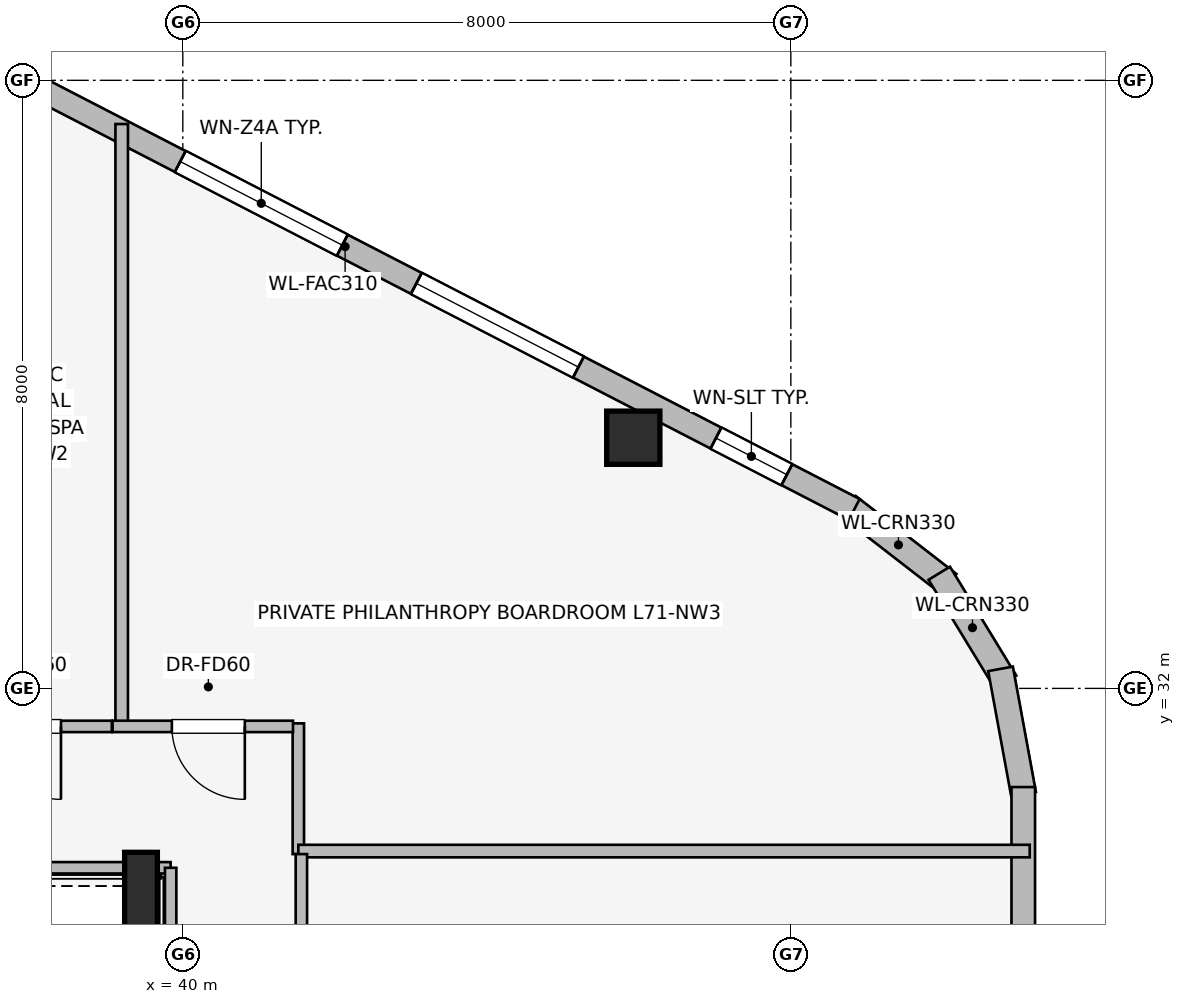
"""IFC4 building model, lengths in metres.
Left out: names, types, materials, properties, quantities, classifications, styles, units other than length and angle.
Written with IfcOpenShell. Run it as: python <this file> out.ifc"""

import sys

from ifc_helpers import new_model, si_unit, direction, frame, frame_2d, origin, origin_2d, place, context, subcontext, project, spatial, rectangle, i_section, extrude, element, fill, save


model = new_model("IFC4")
c1 = context("Model", 3, precision=1e-05, world=origin(), true_north=direction((0.0, 1.0)))
c2 = subcontext(c1, "Body", "Model", "MODEL_VIEW")
j1 = project(units=[si_unit("LENGTHUNIT", "METRE"), si_unit("PLANEANGLEUNIT", "RADIAN")], contexts=[c1])
p1 = place(None, origin())
s1 = spatial("IfcSite", under=j1, at=p1, CompositionType="ELEMENT")
p2 = place(p1, origin())
s2 = spatial("IfcBuilding", under=s1, at=p2, CompositionType="ELEMENT")
p3 = place(p2, frame((0.0, 0.0, 259.65)))
s3 = spatial("IfcBuildingStorey", under=s2, at=p3, CompositionType="ELEMENT", Elevation=259.65)
p4 = place(p3, frame((45.927, 35.298, 0.0), z_axis=(0.0, 0.0, 1.0), x_axis=(1.0, 0.0, 0.0)))
e1 = element("IfcColumn", 1, at=p4, inside=s3, PredefinedType="COLUMN", context=c2, shape_type="SweptSolid", body=[
    extrude(rectangle(XDim=0.7, YDim=0.7, at=origin_2d()), origin(), (0.0, 0.0, 1.0), 3.55),
])
p5 = place(p3, frame((39.45, 29.35, 0.0), z_axis=(0.0, 0.0, 1.0), x_axis=(1.0, 0.0, 0.0)))
e2 = element("IfcColumn", 2, at=p5, inside=s3, PredefinedType="COLUMN", context=c2, shape_type="SweptSolid", body=[
    extrude(i_section(OverallWidth=0.431, OverallDepth=0.987, WebThickness=0.034, FlangeThickness=0.062, at=origin_2d()), origin(), (0.0, 0.0, 1.0), 3.55),
])
p6 = place(p3, frame((48.753, 34.401, 0.0), z_axis=(0.0, 0.0, 1.0), x_axis=(0.790691856293, -0.61221433207, 0.0)))
e3 = element("IfcWall", 3, at=p6, inside=s3, PredefinedType="STANDARD", context=c2, shape_type="SweptSolid", body=[
    extrude(rectangle(XDim=1.676, YDim=0.33, at=frame_2d((0.838, 0.0))), origin(), (0.0, 0.0, 1.0), 3.29),
])
p7 = place(p3, frame((49.953, 33.515, 0.0), z_axis=(0.0, 0.0, 1.0), x_axis=(0.520325409202, -0.853968072318, 0.0)))
e4 = element("IfcWall", 4, at=p7, inside=s3, PredefinedType="STANDARD", context=c2, shape_type="SweptSolid", body=[
    extrude(rectangle(XDim=1.678, YDim=0.33, at=frame_2d((0.839, 0.0))), origin(), (0.0, 0.0, 1.0), 3.29),
])
p8 = place(p3, frame((50.759, 32.257, 0.0), z_axis=(0.0, 0.0, 1.0), x_axis=(0.180691763044, -0.983539773862, 0.0)))
e5 = element("IfcWall", 5, at=p8, inside=s3, PredefinedType="STANDARD", context=c2, shape_type="SweptSolid", body=[
    extrude(rectangle(XDim=1.677, YDim=0.33, at=frame_2d((0.838, 0.0))), origin(), (0.0, 0.0, 1.0), 3.29),
])
p9 = place(p3, frame((35.437, 41.27, 0.0), z_axis=(0.0, 0.0, 1.0), x_axis=(0.888581481622, -0.458718814218, 0.0)))
e6 = element("IfcWall", 6, at=p9, inside=s3, PredefinedType="STANDARD", context=c2, shape_type="SweptSolid", body=[
    extrude(rectangle(XDim=15.077, YDim=0.31, at=frame_2d((7.539, 0.0))), origin(), (0.0, 0.0, 1.0), 3.29),
])
p10 = place(p9, frame((5.097, 0.0, 0.75)))
e7 = element("IfcOpeningElement", 7, at=p10, cuts=e6, PredefinedType="OPENING", context=c2, shape_type="SweptSolid", body=[
    extrude(rectangle(XDim=2.4, YDim=1.6, at=frame_2d((1.2, 0.8))), frame((0.0, 0.165, 0.0), z_axis=(0.0, -1.0, 0.0), x_axis=(1.0, 0.0, 0.0)), (0.0, 0.0, 1.0), 0.33),
])
p11 = place(p9, frame((8.593, 0.0, 0.75)))
e8 = element("IfcOpeningElement", 8, at=p11, cuts=e6, PredefinedType="OPENING", context=c2, shape_type="SweptSolid", body=[
    extrude(rectangle(XDim=2.4, YDim=1.6, at=frame_2d((1.2, 0.8))), frame((0.0, 0.165, 0.0), z_axis=(0.0, -1.0, 0.0), x_axis=(1.0, 0.0, 0.0)), (0.0, 0.0, 1.0), 0.33),
])
p12 = place(p9, frame((13.029, 0.0, 0.75)))
e9 = element("IfcOpeningElement", 9, at=p12, cuts=e6, PredefinedType="OPENING", context=c2, shape_type="SweptSolid", body=[
    extrude(rectangle(XDim=1.05, YDim=1.4, at=frame_2d((0.525, 0.7))), frame((0.0, 0.165, 0.0), z_axis=(0.0, -1.0, 0.0), x_axis=(1.0, 0.0, 0.0)), (0.0, 0.0, 1.0), 0.33),
])
p13 = place(p3, frame((51.058, 30.702, 0.0), z_axis=(0.0, 0.0, 1.0), x_axis=(0.0, -1.0, 0.0)))
e10 = element("IfcWall", 10, at=p13, inside=s3, PredefinedType="STANDARD", context=c2, shape_type="SweptSolid", body=[
    extrude(rectangle(XDim=13.404, YDim=0.31, at=frame_2d((6.702, 0.0))), origin(), (0.0, 0.0, 1.0), 3.29),
])
p14 = place(p13, frame((3.752, 0.0, 0.75)))
e11 = element("IfcOpeningElement", 11, at=p14, cuts=e10, PredefinedType="OPENING", context=c2, shape_type="SweptSolid", body=[
    extrude(rectangle(XDim=2.4, YDim=1.6, at=frame_2d((1.2, 0.8))), frame((0.0, 0.165, 0.0), z_axis=(0.0, -1.0, 0.0), x_axis=(1.0, 0.0, 0.0)), (0.0, 0.0, 1.0), 0.33),
])
p15 = place(p13, frame((7.253, 0.0, 0.75)))
e12 = element("IfcOpeningElement", 12, at=p15, cuts=e10, PredefinedType="OPENING", context=c2, shape_type="SweptSolid", body=[
    extrude(rectangle(XDim=2.4, YDim=1.6, at=frame_2d((1.2, 0.8))), frame((0.0, 0.165, 0.0), z_axis=(0.0, -1.0, 0.0), x_axis=(1.0, 0.0, 0.0)), (0.0, 0.0, 1.0), 0.33),
])
p16 = place(p3, frame((39.84, 29.64, 0.0), z_axis=(0.0, 0.0, 1.0), x_axis=(-1.0, 0.0, 0.0)))
e13 = element("IfcWall", 13, at=p16, inside=s3, PredefinedType="PARTITIONING", context=c2, shape_type="SweptSolid", body=[
    extrude(rectangle(XDim=12.203, YDim=0.15, at=frame_2d((6.102, 0.0))), origin(), (0.0, 0.0, 1.0), 2.431),
])
p17 = place(p3, frame((39.84, 18.36, 0.0), z_axis=(0.0, 0.0, 1.0), x_axis=(0.0, 1.0, 0.0)))
e14 = element("IfcWall", 14, at=p17, inside=s3, PredefinedType="PARTITIONING", context=c2, shape_type="SweptSolid", body=[
    extrude(rectangle(XDim=11.28, YDim=0.15, at=frame_2d((5.64, 0.0))), origin(), (0.0, 0.0, 1.0), 3.29),
])
p18 = place(p3, frame((41.52, 29.82, 0.0), z_axis=(0.0, 0.0, 1.0), x_axis=(0.0, 1.0, 0.0)))
e15 = element("IfcWall", 15, at=p18, inside=s3, PredefinedType="PARTITIONING", context=c2, shape_type="SweptSolid", body=[
    extrude(rectangle(XDim=1.72, YDim=0.15, at=frame_2d((0.86, 0.0))), origin(), (0.0, 0.0, 1.0), 3.29),
])
p19 = place(p3, frame((39.196, 31.51, 0.0), z_axis=(0.0, 0.0, 1.0), x_axis=(0.0, 1.0, 0.0)))
e16 = element("IfcWall", 16, at=p19, inside=s3, PredefinedType="PARTITIONING", context=c2, shape_type="SweptSolid", body=[
    extrude(rectangle(XDim=7.915, YDim=0.165, at=frame_2d((3.958, 0.0))), origin(), (0.0, 0.0, 1.0), 2.679),
])
p20 = place(p3, frame((39.066, 31.5, 0.0), z_axis=(0.0, 0.0, 1.0), x_axis=(-1.0, 0.0, 0.0)))
e17 = element("IfcWall", 17, at=p20, inside=s3, PredefinedType="PARTITIONING", context=c2, shape_type="SweptSolid", body=[
    extrude(rectangle(XDim=2.298, YDim=0.15, at=frame_2d((1.149, 0.0))), origin(), (0.0, 0.0, 1.0), 3.29),
])
p21 = place(p20, frame((0.669, 0.0, 0.0)))
e18 = element("IfcOpeningElement", 18, at=p21, cuts=e17, PredefinedType="OPENING", context=c2, shape_type="SweptSolid", body=[
    extrude(rectangle(XDim=0.96, YDim=2.0, at=frame_2d((0.48, 1.0))), frame((0.0, 0.085, 0.0), z_axis=(0.0, -1.0, 0.0), x_axis=(1.0, 0.0, 0.0)), (0.0, 0.0, 1.0), 0.17),
])
p22 = place(p3, frame((41.45, 31.5, 0.0), z_axis=(0.0, 0.0, 1.0), x_axis=(-1.0, 0.0, 0.0)))
e19 = element("IfcWall", 19, at=p22, inside=s3, PredefinedType="PARTITIONING", context=c2, shape_type="SweptSolid", body=[
    extrude(rectangle(XDim=2.374, YDim=0.15, at=frame_2d((1.187, 0.0))), origin(), (0.0, 0.0, 1.0), 3.29),
])
p23 = place(p22, frame((0.634, 0.0, 0.0)))
e20 = element("IfcOpeningElement", 20, at=p23, cuts=e19, PredefinedType="OPENING", context=c2, shape_type="SweptSolid", body=[
    extrude(rectangle(XDim=0.96, YDim=2.0, at=frame_2d((0.48, 1.0))), frame((0.0, 0.085, 0.0), z_axis=(0.0, -1.0, 0.0), x_axis=(1.0, 0.0, 0.0)), (0.0, 0.0, 1.0), 0.17),
])
p24 = place(p3, frame((41.52, 29.86, 0.0), z_axis=(0.0, 0.0, 1.0), x_axis=(1.0, 0.0, 0.0)))
e21 = element("IfcWall", 21, at=p24, inside=s3, PredefinedType="PARTITIONING", context=c2, shape_type="SweptSolid", body=[
    extrude(rectangle(XDim=9.623, YDim=0.165, at=frame_2d((4.812, 0.0))), origin(), (0.0, 0.0, 1.0), 3.29),
])
p25 = place(p3, frame((41.56, 18.18, 0.0), z_axis=(0.0, 0.0, 1.0), x_axis=(0.0, 1.0, 0.0)))
e22 = element("IfcWall", 22, at=p25, inside=s3, PredefinedType="PARTITIONING", context=c2, shape_type="SweptSolid", body=[
    extrude(rectangle(XDim=11.64, YDim=0.15, at=frame_2d((5.82, 0.0))), origin(), (0.0, 0.0, 1.0), 3.29),
])
p26 = place(p25, frame((6.615, 0.0, 0.0)))
e23 = element("IfcOpeningElement", 23, at=p26, cuts=e22, PredefinedType="OPENING", context=c2, shape_type="SweptSolid", body=[
    extrude(rectangle(XDim=0.96, YDim=2.0, at=frame_2d((0.48, 1.0))), frame((0.0, 0.085, 0.0), z_axis=(0.0, -1.0, 0.0), x_axis=(1.0, 0.0, 0.0)), (0.0, 0.0, 1.0), 0.17),
])
p27 = place(p10, origin())
e24 = element("IfcWindow", 24, at=p27, inside=s3, PartitioningType="SINGLE_PANEL", PredefinedType="WINDOW", context=c2, shape_type="SweptSolid", body=[
    extrude(rectangle(XDim=2.4, YDim=1.6, at=frame_2d((1.2, 0.8))), frame((0.0, 0.03, 0.0), z_axis=(0.0, -1.0, 0.0), x_axis=(1.0, 0.0, 0.0)), (0.0, 0.0, 1.0), 0.06),
])
fill(e7, e24)
p28 = place(p11, origin())
e25 = element("IfcWindow", 25, at=p28, inside=s3, PartitioningType="SINGLE_PANEL", PredefinedType="WINDOW", context=c2, shape_type="SweptSolid", body=[
    extrude(rectangle(XDim=2.4, YDim=1.6, at=frame_2d((1.2, 0.8))), frame((0.0, 0.03, 0.0), z_axis=(0.0, -1.0, 0.0), x_axis=(1.0, 0.0, 0.0)), (0.0, 0.0, 1.0), 0.06),
])
fill(e8, e25)
p29 = place(p12, origin())
e26 = element("IfcWindow", 26, at=p29, inside=s3, PartitioningType="SINGLE_PANEL", PredefinedType="WINDOW", context=c2, shape_type="SweptSolid", body=[
    extrude(rectangle(XDim=1.05, YDim=1.4, at=frame_2d((0.525, 0.7))), frame((0.0, 0.03, 0.0), z_axis=(0.0, -1.0, 0.0), x_axis=(1.0, 0.0, 0.0)), (0.0, 0.0, 1.0), 0.06),
])
fill(e9, e26)
p30 = place(p21, origin())
e27 = element("IfcDoor", 27, at=p30, inside=s3, OperationType="SINGLE_SWING_LEFT", PredefinedType="DOOR", context=c2, shape_type="SweptSolid", body=[
    extrude(rectangle(XDim=0.96, YDim=2.0, at=frame_2d((0.48, 1.0))), frame((0.0, 0.025, 0.0), z_axis=(0.0, -1.0, 0.0), x_axis=(1.0, 0.0, 0.0)), (0.0, 0.0, 1.0), 0.05),
])
fill(e18, e27)
p31 = place(p23, origin())
e28 = element("IfcDoor", 28, at=p31, inside=s3, OperationType="SINGLE_SWING_LEFT", PredefinedType="DOOR", context=c2, shape_type="SweptSolid", body=[
    extrude(rectangle(XDim=0.96, YDim=2.0, at=frame_2d((0.48, 1.0))), frame((0.0, 0.025, 0.0), z_axis=(0.0, -1.0, 0.0), x_axis=(1.0, 0.0, 0.0)), (0.0, 0.0, 1.0), 0.05),
])
fill(e20, e28)
save(model, sys.argv[1])
